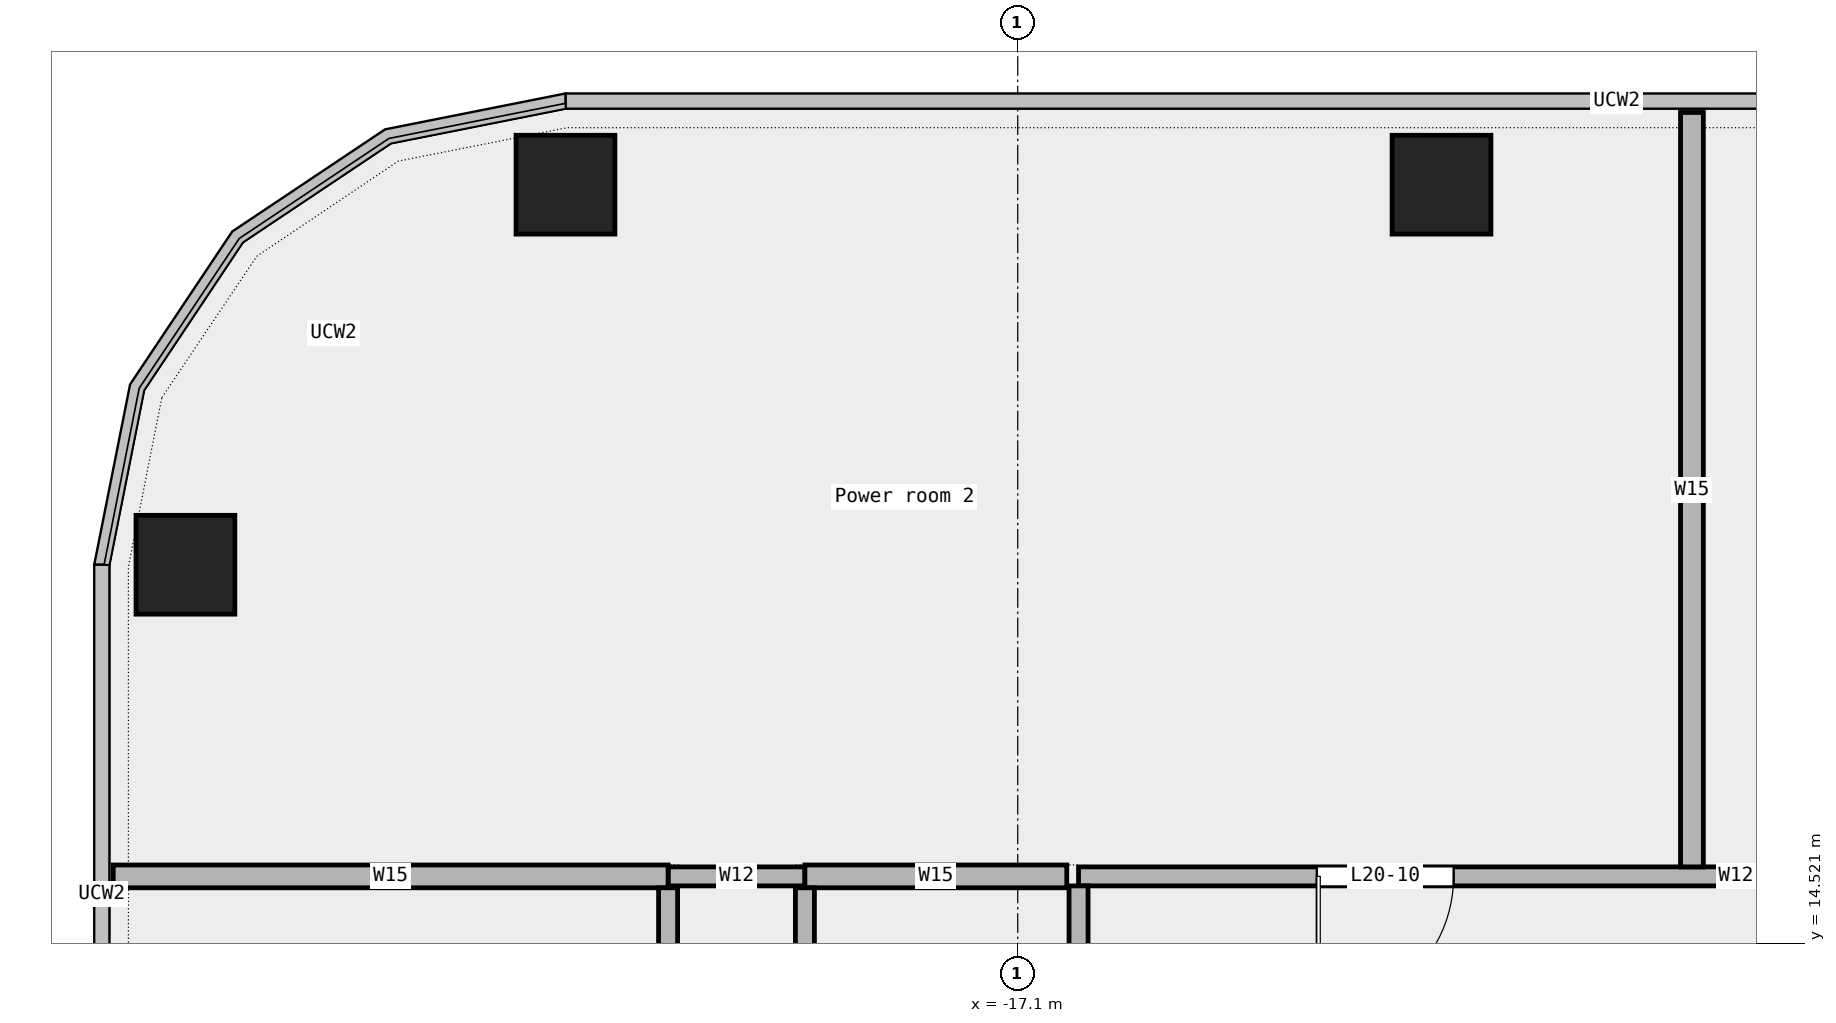
"""IFC4 building model, lengths in metres.
Left out: names, types, materials, properties, quantities, classifications, styles, units other than length and angle.
Written with IfcOpenShell. Run it as: python <this file> out.ifc"""

import sys

from ifc_helpers import new_model, si_unit, direction, frame, frame_2d, origin, origin_2d, place, context, subcontext, project, spatial, rectangle, extrude, element, fill, save


model = new_model("IFC4")
c1 = context("Model", 3, precision=1e-05, world=origin(), true_north=direction((0.0, 1.0)))
c2 = subcontext(c1, "Body", "Model", "MODEL_VIEW")
j1 = project(units=[si_unit("LENGTHUNIT", "METRE"), si_unit("PLANEANGLEUNIT", "RADIAN")], contexts=[c1])
p1 = place(None, origin())
s1 = spatial("IfcSite", under=j1, at=p1, CompositionType="ELEMENT")
p2 = place(p1, origin())
s2 = spatial("IfcBuilding", under=s1, at=p2, CompositionType="ELEMENT")
p3 = place(p2, frame((0.0, 0.0, 103.6)))
s3 = spatial("IfcBuildingStorey", under=s2, at=p3, CompositionType="ELEMENT", Elevation=103.6)
for number, where, z_axis, x_axis in (
    (1, (-11.525, 24.5, 0.0), (0.0, 0.0, 1.0), (1.0, 0.0, 0.0)),
    (2, (-23.05, 24.5, 0.0), (0.0, 0.0, 1.0), (1.0, 0.0, 0.0)),
    (3, (-28.05, 19.5, 0.0), (0.0, 0.0, 1.0), (1.0, 0.0, 0.0)),
):
    element("IfcColumn", number, at=place(p3, frame(where, z_axis=z_axis, x_axis=x_axis)), inside=s3, PredefinedType="COLUMN", context=c2, shape_type="SweptSolid", body=[
        extrude(rectangle(XDim=1.3, YDim=1.3, at=origin_2d()), origin(), (0.0, 0.0, 1.0), 4.05),
    ])
p4 = place(p3, frame((-21.7, 15.4, 0.0), z_axis=(0.0, 0.0, 1.0), x_axis=(1.0, 0.0, 0.0)))
e4 = element("IfcWall", 4, at=p4, inside=s3, PredefinedType="PARTITIONING", context=c2, shape_type="SweptSolid", body=[
    extrude(rectangle(XDim=1.8, YDim=0.25, at=frame_2d((0.9, 0.0))), origin(), (0.0, 0.0, 1.0), 4.05),
])
p5 = place(p3, frame((-16.3, 15.4, 0.0), z_axis=(0.0, 0.0, 1.0), x_axis=(1.0, 0.0, 0.0)))
e5 = element("IfcWall", 5, at=p5, inside=s3, PredefinedType="PARTITIONING", context=c2, shape_type="SweptSolid", body=[
    extrude(rectangle(XDim=17.3, YDim=0.25, at=frame_2d((8.65, 0.0))), origin(), (0.0, 0.0, 1.0), 4.05),
])
p6 = place(p5, frame((12.085, 0.0, 0.0)))
e6 = element("IfcOpeningElement", 6, at=p6, cuts=e5, PredefinedType="OPENING", context=c2, shape_type="SweptSolid", body=[
    extrude(rectangle(XDim=1.2, YDim=2.1, at=frame_2d((0.6, 1.05))), frame((0.0, 0.137, 0.0), z_axis=(0.0, -1.0, 0.0), x_axis=(1.0, 0.0, 0.0)), (0.0, 0.0, 1.0), 0.274),
])
p7 = place(p5, frame((3.135, 0.0, 0.0)))
e7 = element("IfcOpeningElement", 7, at=p7, cuts=e5, PredefinedType="OPENING", context=c2, shape_type="SweptSolid", body=[
    extrude(rectangle(XDim=1.8, YDim=2.1, at=frame_2d((0.9, 1.05))), frame((0.0, 0.137, 0.0), z_axis=(0.0, -1.0, 0.0), x_axis=(1.0, 0.0, 0.0)), (0.0, 0.0, 1.0), 0.274),
])
p8 = place(p3, frame((-29.0, 15.4, 0.0), z_axis=(0.0, 0.0, 1.0), x_axis=(1.0, 0.0, 0.0)))
e8 = element("IfcWall", 8, at=p8, inside=s3, PredefinedType="PARTITIONING", context=c2, shape_type="SweptSolid", body=[
    extrude(rectangle(XDim=7.3, YDim=0.3, at=frame_2d((3.65, 0.0))), origin(), (0.0, 0.0, 1.0), 4.05),
])
p9 = place(p3, frame((-19.9, 15.4, 0.0), z_axis=(0.0, 0.0, 1.0), x_axis=(1.0, 0.0, 0.0)))
e9 = element("IfcWall", 9, at=p9, inside=s3, PredefinedType="PARTITIONING", context=c2, shape_type="SweptSolid", body=[
    extrude(rectangle(XDim=3.445, YDim=0.3, at=frame_2d((1.722, 0.0))), origin(), (0.0, 0.0, 1.0), 4.05),
])
p10 = place(p3, frame((-21.7, 10.96, 0.0), z_axis=(0.0, 0.0, 1.0), x_axis=(0.0, 1.0, 0.0)))
e10 = element("IfcWall", 10, at=p10, inside=s3, PredefinedType="PARTITIONING", context=c2, shape_type="SweptSolid", body=[
    extrude(rectangle(XDim=4.29, YDim=0.25, at=frame_2d((2.145, 0.0))), origin(), (0.0, 0.0, 1.0), 4.05),
])
p11 = place(p10, frame((1.545, 0.0, 0.0)))
e11 = element("IfcOpeningElement", 11, at=p11, cuts=e10, PredefinedType="OPENING", context=c2, shape_type="SweptSolid", body=[
    extrude(rectangle(XDim=1.2, YDim=2.1, at=frame_2d((0.6, 1.05))), frame((0.0, 0.137, 0.0), z_axis=(0.0, -1.0, 0.0), x_axis=(1.0, 0.0, 0.0)), (0.0, 0.0, 1.0), 0.274),
])
p12 = place(p3, frame((-19.9, 9.21, 0.0), z_axis=(0.0, 0.0, 1.0), x_axis=(0.0, 1.0, 0.0)))
e12 = element("IfcWall", 12, at=p12, inside=s3, PredefinedType="PARTITIONING", context=c2, shape_type="SweptSolid", body=[
    extrude(rectangle(XDim=6.04, YDim=0.25, at=frame_2d((3.02, 0.0))), origin(), (0.0, 0.0, 1.0), 4.05),
])
p13 = place(p3, frame((-16.3, 11.75, 0.0), z_axis=(0.0, 0.0, 1.0), x_axis=(0.0, 1.0, 0.0)))
e13 = element("IfcWall", 13, at=p13, inside=s3, PredefinedType="PARTITIONING", context=c2, shape_type="SweptSolid", body=[
    extrude(rectangle(XDim=3.525, YDim=0.25, at=frame_2d((1.762, 0.0))), origin(), (0.0, 0.0, 1.0), 4.05),
])
p14 = place(p13, frame((1.312, 0.0, 0.0)))
e14 = element("IfcOpeningElement", 14, at=p14, cuts=e13, PredefinedType="OPENING", context=c2, shape_type="SweptSolid", body=[
    extrude(rectangle(XDim=0.9, YDim=2.1, at=frame_2d((0.45, 1.05))), frame((0.0, 0.137, 0.0), z_axis=(0.0, -1.0, 0.0), x_axis=(1.0, 0.0, 0.0)), (0.0, 0.0, 1.0), 0.274),
])
p15 = place(p3, frame((-8.23, 15.525, 0.0), z_axis=(0.0, 0.0, 1.0), x_axis=(0.0, 1.0, 0.0)))
e15 = element("IfcWall", 15, at=p15, inside=s3, PredefinedType="PARTITIONING", context=c2, shape_type="SweptSolid", body=[
    extrude(rectangle(XDim=9.925, YDim=0.3, at=frame_2d((4.962, 0.0))), origin(), (0.0, 0.0, 1.0), 4.05),
])
p16 = place(p7, origin())
e16 = element("IfcDoor", 16, at=p16, inside=s3, OperationType="DOUBLE_DOOR_SINGLE_SWING", PredefinedType="DOOR", context=c2, shape_type="SweptSolid", body=[
    extrude(rectangle(XDim=1.8, YDim=2.1, at=frame_2d((0.9, 1.05))), frame((0.0, 0.025, 0.0), z_axis=(0.0, -1.0, 0.0), x_axis=(1.0, 0.0, 0.0)), (0.0, 0.0, 1.0), 0.05),
])
fill(e7, e16)
save(model, sys.argv[1])
